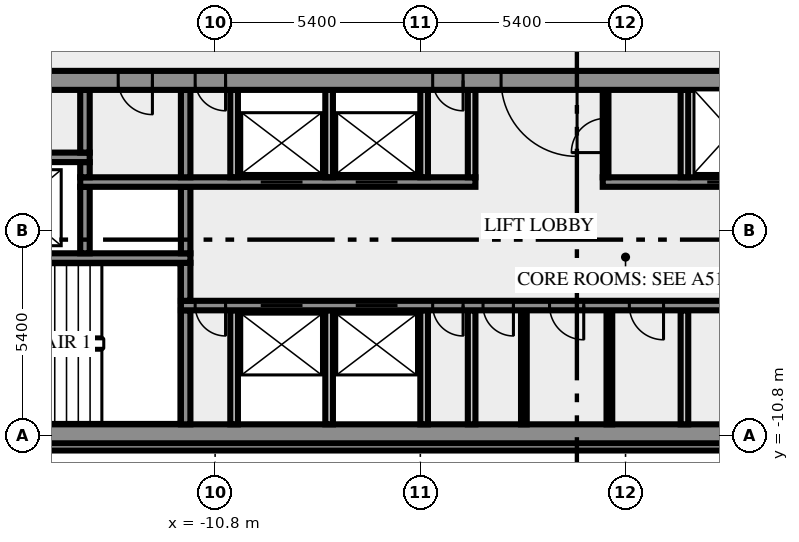
"""IFC4 building model, lengths in metres.
Left out: names, types, materials, properties, quantities, classifications, styles, units other than length and angle.
Written with IfcOpenShell. Run it as: python <this file> out.ifc"""

import sys

from ifc_helpers import new_model, si_unit, direction, frame, frame_2d, origin, place, context, subcontext, project, spatial, rectangle, extrude, element, fill, save


model = new_model("IFC4")
c1 = context("Model", 3, precision=1e-05, world=origin(), true_north=direction((0.0, 1.0)))
c2 = subcontext(c1, "Body", "Model", "MODEL_VIEW")
j1 = project(units=[si_unit("LENGTHUNIT", "METRE"), si_unit("PLANEANGLEUNIT", "RADIAN")], contexts=[c1])
p1 = place(None, origin())
s1 = spatial("IfcSite", under=j1, at=p1, CompositionType="ELEMENT")
p2 = place(p1, origin())
s2 = spatial("IfcBuilding", under=s1, at=p2, CompositionType="ELEMENT")
p3 = place(p2, frame((0.0, 0.0, 315.0)))
s3 = spatial("IfcBuildingStorey", under=s2, at=p3, CompositionType="ELEMENT", Elevation=315.0)
p4 = place(p3, frame((-17.444, -11.088, 0.0), z_axis=(0.0, 0.0, 1.0), x_axis=(1.0, 0.0, 0.0)))
e1 = element("IfcWall", 1, at=p4, inside=s3, PredefinedType="SOLIDWALL", context=c2, shape_type="SweptSolid", body=[
    extrude(rectangle(XDim=34.888, YDim=0.2, at=frame_2d((17.444, 0.0))), origin(), (0.0, 0.0, 1.0), 3.65),
])
p5 = place(p3, frame((-20.0, -10.75, 0.0), z_axis=(0.0, 0.0, 1.0), x_axis=(1.0, 0.0, 0.0)))
e2 = element("IfcWall", 2, at=p5, inside=s3, PredefinedType="SHEAR", context=c2, shape_type="SweptSolid", body=[
    extrude(rectangle(XDim=40.0, YDim=0.5, at=frame_2d((20.0, 0.0))), origin(), (0.0, 0.0, 1.0), 3.65),
])
p6 = place(p5, frame((0.8, 0.0, 1.0)))
e3 = element("IfcOpeningElement", 3, at=p6, cuts=e2, PredefinedType="OPENING", context=c2, shape_type="SweptSolid", body=[
    extrude(rectangle(XDim=1.2, YDim=1.2, at=frame_2d((0.6, 0.6))), frame((0.0, 0.26, 0.0), z_axis=(0.0, -1.0, 0.0), x_axis=(1.0, 0.0, 0.0)), (0.0, 0.0, 1.0), 0.52),
])
p7 = place(p5, frame((38.0, 0.0, 1.0)))
e4 = element("IfcOpeningElement", 4, at=p7, cuts=e2, PredefinedType="OPENING", context=c2, shape_type="SweptSolid", body=[
    extrude(rectangle(XDim=1.2, YDim=1.2, at=frame_2d((0.6, 0.6))), frame((0.0, 0.26, 0.0), z_axis=(0.0, -1.0, 0.0), x_axis=(1.0, 0.0, 0.0)), (0.0, 0.0, 1.0), 0.52),
])
p8 = place(p3, frame((-11.575, -10.5, 0.0), z_axis=(0.0, 0.0, 1.0), x_axis=(0.0, 1.0, 0.0)))
e5 = element("IfcWall", 5, at=p8, inside=s3, PredefinedType="SHEAR", context=c2, shape_type="SweptSolid", body=[
    extrude(rectangle(XDim=3.0, YDim=0.25, at=frame_2d((1.5, 0.0))), origin(), (0.0, 0.0, 1.0), 3.65),
])
for number, where, z_axis, x_axis in (
    (6, (-10.3, -10.5, 0.0), (0.0, 0.0, 1.0), (0.0, 1.0, 0.0)),
    (7, (-7.8, -10.5, 0.0), (0.0, 0.0, 1.0), (0.0, 1.0, 0.0)),
    (8, (-5.3, -10.5, 0.0), (0.0, 0.0, 1.0), (0.0, 1.0, 0.0)),
    (9, (-4.05, -10.5, 0.0), (0.0, 0.0, 1.0), (0.0, 1.0, 0.0)),
):
    element("IfcWall", number, at=place(p3, frame(where, z_axis=z_axis, x_axis=x_axis)), inside=s3, PredefinedType="SOLIDWALL", context=c2, shape_type="SweptSolid", body=[
        extrude(rectangle(XDim=3.0, YDim=0.2, at=frame_2d((1.5, 0.0))), origin(), (0.0, 0.0, 1.0), 3.65),
    ])
for number, where, z_axis, x_axis in (
    (10, (-2.675, -10.5, 0.0), (0.0, 0.0, 1.0), (0.0, 1.0, 0.0)),
    (11, (-0.425, -10.5, 0.0), (0.0, 0.0, 1.0), (0.0, 1.0, 0.0)),
):
    element("IfcWall", number, at=place(p3, frame(where, z_axis=z_axis, x_axis=x_axis)), inside=s3, PredefinedType="PARTITIONING", context=c2, shape_type="SweptSolid", body=[
        extrude(rectangle(XDim=3.0, YDim=0.15, at=frame_2d((1.5, 0.0))), origin(), (0.0, 0.0, 1.0), 3.65),
    ])
p9 = place(p3, frame((1.55, -10.5, 0.0), z_axis=(0.0, 0.0, 1.0), x_axis=(0.0, 1.0, 0.0)))
e12 = element("IfcWall", 12, at=p9, inside=s3, PredefinedType="SOLIDWALL", context=c2, shape_type="SweptSolid", body=[
    extrude(rectangle(XDim=3.0, YDim=0.2, at=frame_2d((1.5, 0.0))), origin(), (0.0, 0.0, 1.0), 3.65),
])
p10 = place(p3, frame((11.7, -7.375, 0.0), z_axis=(0.0, 0.0, 1.0), x_axis=(-1.0, 0.0, 0.0)))
e13 = element("IfcWall", 13, at=p10, inside=s3, PredefinedType="SHEAR", context=c2, shape_type="SweptSolid", body=[
    extrude(rectangle(XDim=23.4, YDim=0.25, at=frame_2d((11.7, 0.0))), origin(), (0.0, 0.0, 1.0), 3.65),
])
p11 = place(p10, frame((22.225, 0.0, 0.0)))
e14 = element("IfcOpeningElement", 14, at=p11, cuts=e13, PredefinedType="OPENING", context=c2, shape_type="SweptSolid", body=[
    extrude(rectangle(XDim=0.8, YDim=2.1, at=frame_2d((0.4, 1.05))), frame((0.0, 0.135, 0.0), z_axis=(0.0, -1.0, 0.0), x_axis=(1.0, 0.0, 0.0)), (0.0, 0.0, 1.0), 0.27),
])
p12 = place(p10, frame((20.2, 0.0, 0.0)))
e15 = element("IfcOpeningElement", 15, at=p12, cuts=e13, PredefinedType="OPENING", context=c2, shape_type="SweptSolid", body=[
    extrude(rectangle(XDim=1.1, YDim=2.1, at=frame_2d((0.55, 1.05))), frame((0.0, 0.135, 0.0), z_axis=(0.0, -1.0, 0.0), x_axis=(1.0, 0.0, 0.0)), (0.0, 0.0, 1.0), 0.27),
])
p13 = place(p10, frame((17.7, 0.0, 0.0)))
e16 = element("IfcOpeningElement", 16, at=p13, cuts=e13, PredefinedType="OPENING", context=c2, shape_type="SweptSolid", body=[
    extrude(rectangle(XDim=1.1, YDim=2.1, at=frame_2d((0.55, 1.05))), frame((0.0, 0.135, 0.0), z_axis=(0.0, -1.0, 0.0), x_axis=(1.0, 0.0, 0.0)), (0.0, 0.0, 1.0), 0.27),
])
p14 = place(p10, frame((15.975, 0.0, 0.0)))
e17 = element("IfcOpeningElement", 17, at=p14, cuts=e13, PredefinedType="OPENING", context=c2, shape_type="SweptSolid", body=[
    extrude(rectangle(XDim=0.8, YDim=2.1, at=frame_2d((0.4, 1.05))), frame((0.0, 0.135, 0.0), z_axis=(0.0, -1.0, 0.0), x_axis=(1.0, 0.0, 0.0)), (0.0, 0.0, 1.0), 0.27),
])
p15 = place(p10, frame((14.65, 0.0, 0.0)))
e18 = element("IfcOpeningElement", 18, at=p15, cuts=e13, PredefinedType="OPENING", context=c2, shape_type="SweptSolid", body=[
    extrude(rectangle(XDim=0.8, YDim=2.1, at=frame_2d((0.4, 1.05))), frame((0.0, 0.135, 0.0), z_axis=(0.0, -1.0, 0.0), x_axis=(1.0, 0.0, 0.0)), (0.0, 0.0, 1.0), 0.27),
])
p16 = place(p10, frame((12.8, 0.0, 0.0)))
e19 = element("IfcOpeningElement", 19, at=p16, cuts=e13, PredefinedType="OPENING", context=c2, shape_type="SweptSolid", body=[
    extrude(rectangle(XDim=0.9, YDim=2.1, at=frame_2d((0.45, 1.05))), frame((0.0, 0.135, 0.0), z_axis=(0.0, -1.0, 0.0), x_axis=(1.0, 0.0, 0.0)), (0.0, 0.0, 1.0), 0.27),
])
p17 = place(p10, frame((10.7, 0.0, 0.0)))
e20 = element("IfcOpeningElement", 20, at=p17, cuts=e13, PredefinedType="OPENING", context=c2, shape_type="SweptSolid", body=[
    extrude(rectangle(XDim=0.9, YDim=2.1, at=frame_2d((0.45, 1.05))), frame((0.0, 0.135, 0.0), z_axis=(0.0, -1.0, 0.0), x_axis=(1.0, 0.0, 0.0)), (0.0, 0.0, 1.0), 0.27),
])
p18 = place(p10, frame((6.237, 0.0, 0.0)))
e21 = element("IfcOpeningElement", 21, at=p18, cuts=e13, PredefinedType="OPENING", context=c2, shape_type="SweptSolid", body=[
    extrude(rectangle(XDim=0.9, YDim=2.1, at=frame_2d((0.45, 1.05))), frame((0.0, 0.135, 0.0), z_axis=(0.0, -1.0, 0.0), x_axis=(1.0, 0.0, 0.0)), (0.0, 0.0, 1.0), 0.27),
])
p19 = place(p10, frame((1.263, 0.0, 0.0)))
e22 = element("IfcOpeningElement", 22, at=p19, cuts=e13, PredefinedType="OPENING", context=c2, shape_type="SweptSolid", body=[
    extrude(rectangle(XDim=0.9, YDim=2.1, at=frame_2d((0.45, 1.05))), frame((0.0, 0.135, 0.0), z_axis=(0.0, -1.0, 0.0), x_axis=(1.0, 0.0, 0.0)), (0.0, 0.0, 1.0), 0.27),
])
p20 = place(p3, frame((-11.575, -7.25, 0.0), z_axis=(0.0, 0.0, 1.0), x_axis=(0.0, 1.0, 0.0)))
e23 = element("IfcWall", 23, at=p20, inside=s3, PredefinedType="SHEAR", context=c2, shape_type="SweptSolid", body=[
    extrude(rectangle(XDim=1.0, YDim=0.25, at=frame_2d((0.5, 0.0))), origin(), (0.0, 0.0, 1.0), 3.65),
])
p21 = place(p3, frame((-11.45, -6.125, 0.0), z_axis=(0.0, 0.0, 1.0), x_axis=(-1.0, 0.0, 0.0)))
e24 = element("IfcWall", 24, at=p21, inside=s3, PredefinedType="SHEAR", context=c2, shape_type="SweptSolid", body=[
    extrude(rectangle(XDim=8.05, YDim=0.25, at=frame_2d((4.025, 0.0))), origin(), (0.0, 0.0, 1.0), 3.65),
])
p22 = place(p21, frame((6.2, 0.0, 0.0)))
e25 = element("IfcOpeningElement", 25, at=p22, cuts=e24, PredefinedType="OPENING", context=c2, shape_type="SweptSolid", body=[
    extrude(rectangle(XDim=1.8, YDim=2.1, at=frame_2d((0.9, 1.05))), frame((0.0, 0.135, 0.0), z_axis=(0.0, -1.0, 0.0), x_axis=(1.0, 0.0, 0.0)), (0.0, 0.0, 1.0), 0.27),
])
for number, where, z_axis, x_axis in (
    (26, (-14.225, -6.0, 0.0), (0.0, 0.0, 1.0), (0.0, 1.0, 0.0)),
    (27, (-11.575, -6.0, 0.0), (0.0, 0.0, 1.0), (0.0, 1.0, 0.0)),
):
    element("IfcWall", number, at=place(p3, frame(where, z_axis=z_axis, x_axis=x_axis)), inside=s3, PredefinedType="SHEAR", context=c2, shape_type="SweptSolid", body=[
        extrude(rectangle(XDim=1.75, YDim=0.25, at=frame_2d((0.875, 0.0))), origin(), (0.0, 0.0, 1.0), 3.65),
    ])
p23 = place(p3, frame((-14.35, -4.125, 0.0), z_axis=(0.0, 0.0, 1.0), x_axis=(1.0, 0.0, 0.0)))
e28 = element("IfcWall", 28, at=p23, inside=s3, PredefinedType="SHEAR", context=c2, shape_type="SweptSolid", body=[
    extrude(rectangle(XDim=10.4, YDim=0.25, at=frame_2d((5.2, 0.0))), origin(), (0.0, 0.0, 1.0), 3.65),
])
p24 = place(p23, frame((4.75, 0.0, 0.0)))
e29 = element("IfcOpeningElement", 29, at=p24, cuts=e28, PredefinedType="OPENING", context=c2, shape_type="SweptSolid", body=[
    extrude(rectangle(XDim=1.1, YDim=2.1, at=frame_2d((0.55, 1.05))), frame((0.0, 0.135, 0.0), z_axis=(0.0, -1.0, 0.0), x_axis=(1.0, 0.0, 0.0)), (0.0, 0.0, 1.0), 0.27),
])
p25 = place(p23, frame((7.25, 0.0, 0.0)))
e30 = element("IfcOpeningElement", 30, at=p25, cuts=e28, PredefinedType="OPENING", context=c2, shape_type="SweptSolid", body=[
    extrude(rectangle(XDim=1.1, YDim=2.1, at=frame_2d((0.55, 1.05))), frame((0.0, 0.135, 0.0), z_axis=(0.0, -1.0, 0.0), x_axis=(1.0, 0.0, 0.0)), (0.0, 0.0, 1.0), 0.27),
])
p26 = place(p3, frame((-0.6, -4.125, 0.0), z_axis=(0.0, 0.0, 1.0), x_axis=(1.0, 0.0, 0.0)))
e31 = element("IfcWall", 31, at=p26, inside=s3, PredefinedType="SHEAR", context=c2, shape_type="SweptSolid", body=[
    extrude(rectangle(XDim=14.95, YDim=0.25, at=frame_2d((7.475, 0.0))), origin(), (0.0, 0.0, 1.0), 3.65),
])
p27 = place(p26, frame((2.75, 0.0, 0.0)))
e32 = element("IfcOpeningElement", 32, at=p27, cuts=e31, PredefinedType="OPENING", context=c2, shape_type="SweptSolid", body=[
    extrude(rectangle(XDim=1.3, YDim=2.1, at=frame_2d((0.65, 1.05))), frame((0.0, 0.135, 0.0), z_axis=(0.0, -1.0, 0.0), x_axis=(1.0, 0.0, 0.0)), (0.0, 0.0, 1.0), 0.27),
])
p28 = place(p3, frame((-14.225, -4.0, 0.0), z_axis=(0.0, 0.0, 1.0), x_axis=(0.0, 1.0, 0.0)))
e33 = element("IfcWall", 33, at=p28, inside=s3, PredefinedType="SHEAR", context=c2, shape_type="SweptSolid", body=[
    extrude(rectangle(XDim=0.4, YDim=0.25, at=frame_2d((0.2, 0.0))), origin(), (0.0, 0.0, 1.0), 3.65),
])
p29 = place(p3, frame((-11.575, -4.0, 0.0), z_axis=(0.0, 0.0, 1.0), x_axis=(0.0, 1.0, 0.0)))
e34 = element("IfcWall", 34, at=p29, inside=s3, PredefinedType="SHEAR", context=c2, shape_type="SweptSolid", body=[
    extrude(rectangle(XDim=2.3, YDim=0.25, at=frame_2d((1.15, 0.0))), origin(), (0.0, 0.0, 1.0), 3.65),
])
for number, where, z_axis, x_axis in (
    (35, (-10.3, -4.0, 0.0), (0.0, 0.0, 1.0), (0.0, 1.0, 0.0)),
    (36, (-7.8, -4.0, 0.0), (0.0, 0.0, 1.0), (0.0, 1.0, 0.0)),
    (37, (-5.3, -4.0, 0.0), (0.0, 0.0, 1.0), (0.0, 1.0, 0.0)),
    (38, (-4.05, -4.0, 0.0), (0.0, 0.0, 1.0), (0.0, 1.0, 0.0)),
):
    element("IfcWall", number, at=place(p3, frame(where, z_axis=z_axis, x_axis=x_axis)), inside=s3, PredefinedType="SOLIDWALL", context=c2, shape_type="SweptSolid", body=[
        extrude(rectangle(XDim=2.3, YDim=0.2, at=frame_2d((1.15, 0.0))), origin(), (0.0, 0.0, 1.0), 3.65),
    ])
p30 = place(p3, frame((-0.525, -4.0, 0.0), z_axis=(0.0, 0.0, 1.0), x_axis=(0.0, 1.0, 0.0)))
e39 = element("IfcWall", 39, at=p30, inside=s3, PredefinedType="PARTITIONING", context=c2, shape_type="SweptSolid", body=[
    extrude(rectangle(XDim=2.3, YDim=0.15, at=frame_2d((1.15, 0.0))), origin(), (0.0, 0.0, 1.0), 3.65),
])
p31 = place(p30, frame((0.65, 0.0, 0.0)))
e40 = element("IfcOpeningElement", 40, at=p31, cuts=e39, PredefinedType="OPENING", context=c2, shape_type="SweptSolid", body=[
    extrude(rectangle(XDim=0.9, YDim=2.1, at=frame_2d((0.45, 1.05))), frame((0.0, 0.085, 0.0), z_axis=(0.0, -1.0, 0.0), x_axis=(1.0, 0.0, 0.0)), (0.0, 0.0, 1.0), 0.17),
])
p32 = place(p3, frame((1.55, -4.0, 0.0), z_axis=(0.0, 0.0, 1.0), x_axis=(0.0, 1.0, 0.0)))
e41 = element("IfcWall", 41, at=p32, inside=s3, PredefinedType="SOLIDWALL", context=c2, shape_type="SweptSolid", body=[
    extrude(rectangle(XDim=2.3, YDim=0.2, at=frame_2d((1.15, 0.0))), origin(), (0.0, 0.0, 1.0), 3.65),
])
p33 = place(p3, frame((-17.35, -3.475, 0.0), z_axis=(0.0, 0.0, 1.0), x_axis=(1.0, 0.0, 0.0)))
e42 = element("IfcWall", 42, at=p33, inside=s3, PredefinedType="SHEAR", context=c2, shape_type="SweptSolid", body=[
    extrude(rectangle(XDim=3.25, YDim=0.25, at=frame_2d((1.625, 0.0))), origin(), (0.0, 0.0, 1.0), 3.65),
])
p34 = place(p3, frame((-14.225, -3.35, 0.0), z_axis=(0.0, 0.0, 1.0), x_axis=(0.0, 1.0, 0.0)))
e43 = element("IfcWall", 43, at=p34, inside=s3, PredefinedType="SHEAR", context=c2, shape_type="SweptSolid", body=[
    extrude(rectangle(XDim=1.65, YDim=0.25, at=frame_2d((0.825, 0.0))), origin(), (0.0, 0.0, 1.0), 3.65),
])
p35 = place(p3, frame((20.49, -1.45, 0.0), z_axis=(0.0, 0.0, 1.0), x_axis=(-1.0, 0.0, 0.0)))
e44 = element("IfcWall", 44, at=p35, inside=s3, PredefinedType="SHEAR", context=c2, shape_type="SweptSolid", body=[
    extrude(rectangle(XDim=40.98, YDim=0.5, at=frame_2d((20.49, 0.0))), origin(), (0.0, 0.0, 1.0), 3.65),
])
p36 = place(p35, frame((38.14, 0.0, 0.0)))
e45 = element("IfcOpeningElement", 45, at=p36, cuts=e44, PredefinedType="OPENING", context=c2, shape_type="SweptSolid", body=[
    extrude(rectangle(XDim=1.8, YDim=2.1, at=frame_2d((0.9, 1.05))), frame((0.0, 0.26, 0.0), z_axis=(0.0, -1.0, 0.0), x_axis=(1.0, 0.0, 0.0)), (0.0, 0.0, 1.0), 0.52),
])
p37 = place(p35, frame((35.89, 0.0, 0.0)))
e46 = element("IfcOpeningElement", 46, at=p37, cuts=e44, PredefinedType="OPENING", context=c2, shape_type="SweptSolid", body=[
    extrude(rectangle(XDim=0.9, YDim=2.1, at=frame_2d((0.45, 1.05))), frame((0.0, 0.26, 0.0), z_axis=(0.0, -1.0, 0.0), x_axis=(1.0, 0.0, 0.0)), (0.0, 0.0, 1.0), 0.52),
])
p38 = place(p35, frame((32.94, 0.0, 0.0)))
e47 = element("IfcOpeningElement", 47, at=p38, cuts=e44, PredefinedType="OPENING", context=c2, shape_type="SweptSolid", body=[
    extrude(rectangle(XDim=0.9, YDim=2.1, at=frame_2d((0.45, 1.05))), frame((0.0, 0.26, 0.0), z_axis=(0.0, -1.0, 0.0), x_axis=(1.0, 0.0, 0.0)), (0.0, 0.0, 1.0), 0.52),
])
p39 = place(p35, frame((31.015, 0.0, 0.0)))
e48 = element("IfcOpeningElement", 48, at=p39, cuts=e44, PredefinedType="OPENING", context=c2, shape_type="SweptSolid", body=[
    extrude(rectangle(XDim=0.8, YDim=2.1, at=frame_2d((0.4, 1.05))), frame((0.0, 0.26, 0.0), z_axis=(0.0, -1.0, 0.0), x_axis=(1.0, 0.0, 0.0)), (0.0, 0.0, 1.0), 0.52),
])
p40 = place(p35, frame((24.765, 0.0, 0.0)))
e49 = element("IfcOpeningElement", 49, at=p40, cuts=e44, PredefinedType="OPENING", context=c2, shape_type="SweptSolid", body=[
    extrude(rectangle(XDim=0.8, YDim=2.1, at=frame_2d((0.4, 1.05))), frame((0.0, 0.26, 0.0), z_axis=(0.0, -1.0, 0.0), x_axis=(1.0, 0.0, 0.0)), (0.0, 0.0, 1.0), 0.52),
])
p41 = place(p35, frame((21.765, 0.0, 0.0)))
e50 = element("IfcOpeningElement", 50, at=p41, cuts=e44, PredefinedType="OPENING", context=c2, shape_type="SweptSolid", body=[
    extrude(rectangle(XDim=2.0, YDim=2.1, at=frame_2d((1.0, 1.05))), frame((0.0, 0.26, 0.0), z_axis=(0.0, -1.0, 0.0), x_axis=(1.0, 0.0, 0.0)), (0.0, 0.0, 1.0), 0.52),
])
p42 = place(p35, frame((12.24, 0.0, 0.0)))
e51 = element("IfcOpeningElement", 51, at=p42, cuts=e44, PredefinedType="OPENING", context=c2, shape_type="SweptSolid", body=[
    extrude(rectangle(XDim=0.9, YDim=2.1, at=frame_2d((0.45, 1.05))), frame((0.0, 0.26, 0.0), z_axis=(0.0, -1.0, 0.0), x_axis=(1.0, 0.0, 0.0)), (0.0, 0.0, 1.0), 0.52),
])
p43 = place(p35, frame((7.14, 0.0, 0.0)))
e52 = element("IfcOpeningElement", 52, at=p43, cuts=e44, PredefinedType="OPENING", context=c2, shape_type="SweptSolid", body=[
    extrude(rectangle(XDim=0.9, YDim=2.1, at=frame_2d((0.45, 1.05))), frame((0.0, 0.26, 0.0), z_axis=(0.0, -1.0, 0.0), x_axis=(1.0, 0.0, 0.0)), (0.0, 0.0, 1.0), 0.52),
])
p44 = place(p35, frame((5.028, 0.0, 0.0)))
e53 = element("IfcOpeningElement", 53, at=p44, cuts=e44, PredefinedType="OPENING", context=c2, shape_type="SweptSolid", body=[
    extrude(rectangle(XDim=0.8, YDim=2.1, at=frame_2d((0.4, 1.05))), frame((0.0, 0.26, 0.0), z_axis=(0.0, -1.0, 0.0), x_axis=(1.0, 0.0, 0.0)), (0.0, 0.0, 1.0), 0.52),
])
p45 = place(p35, frame((3.452, 0.0, 0.0)))
e54 = element("IfcOpeningElement", 54, at=p45, cuts=e44, PredefinedType="OPENING", context=c2, shape_type="SweptSolid", body=[
    extrude(rectangle(XDim=0.8, YDim=2.1, at=frame_2d((0.4, 1.05))), frame((0.0, 0.26, 0.0), z_axis=(0.0, -1.0, 0.0), x_axis=(1.0, 0.0, 0.0)), (0.0, 0.0, 1.0), 0.52),
])
p46 = place(p35, frame((1.04, 0.0, 0.0)))
e55 = element("IfcOpeningElement", 55, at=p46, cuts=e44, PredefinedType="OPENING", context=c2, shape_type="SweptSolid", body=[
    extrude(rectangle(XDim=1.8, YDim=2.1, at=frame_2d((0.9, 1.05))), frame((0.0, 0.26, 0.0), z_axis=(0.0, -1.0, 0.0), x_axis=(1.0, 0.0, 0.0)), (0.0, 0.0, 1.0), 0.52),
])
p47 = place(p11, origin())
e56 = element("IfcDoor", 56, at=p47, inside=s3, OperationType="SINGLE_SWING_RIGHT", PredefinedType="DOOR", context=c2, shape_type="SweptSolid", body=[
    extrude(rectangle(XDim=0.8, YDim=2.1, at=frame_2d((0.4, 1.05))), frame((0.0, 0.025, 0.0), z_axis=(0.0, -1.0, 0.0), x_axis=(1.0, 0.0, 0.0)), (0.0, 0.0, 1.0), 0.05),
])
fill(e14, e56)
p48 = place(p12, origin())
e57 = element("IfcDoor", 57, at=p48, inside=s3, OperationType="DOUBLE_DOOR_SLIDING", PredefinedType="DOOR", context=c2, shape_type="SweptSolid", body=[
    extrude(rectangle(XDim=1.1, YDim=2.1, at=frame_2d((0.55, 1.05))), frame((0.0, 0.025, 0.0), z_axis=(0.0, -1.0, 0.0), x_axis=(1.0, 0.0, 0.0)), (0.0, 0.0, 1.0), 0.05),
])
fill(e15, e57)
p49 = place(p13, origin())
e58 = element("IfcDoor", 58, at=p49, inside=s3, OperationType="DOUBLE_DOOR_SLIDING", PredefinedType="DOOR", context=c2, shape_type="SweptSolid", body=[
    extrude(rectangle(XDim=1.1, YDim=2.1, at=frame_2d((0.55, 1.05))), frame((0.0, 0.025, 0.0), z_axis=(0.0, -1.0, 0.0), x_axis=(1.0, 0.0, 0.0)), (0.0, 0.0, 1.0), 0.05),
])
fill(e16, e58)
p50 = place(p14, origin())
e59 = element("IfcDoor", 59, at=p50, inside=s3, OperationType="SINGLE_SWING_RIGHT", PredefinedType="DOOR", context=c2, shape_type="SweptSolid", body=[
    extrude(rectangle(XDim=0.8, YDim=2.1, at=frame_2d((0.4, 1.05))), frame((0.0, 0.025, 0.0), z_axis=(0.0, -1.0, 0.0), x_axis=(1.0, 0.0, 0.0)), (0.0, 0.0, 1.0), 0.05),
])
fill(e17, e59)
p51 = place(p15, origin())
e60 = element("IfcDoor", 60, at=p51, inside=s3, OperationType="SINGLE_SWING_RIGHT", PredefinedType="DOOR", context=c2, shape_type="SweptSolid", body=[
    extrude(rectangle(XDim=0.8, YDim=2.1, at=frame_2d((0.4, 1.05))), frame((0.0, 0.025, 0.0), z_axis=(0.0, -1.0, 0.0), x_axis=(1.0, 0.0, 0.0)), (0.0, 0.0, 1.0), 0.05),
])
fill(e18, e60)
p52 = place(p16, origin())
e61 = element("IfcDoor", 61, at=p52, inside=s3, OperationType="SINGLE_SWING_RIGHT", PredefinedType="DOOR", context=c2, shape_type="SweptSolid", body=[
    extrude(rectangle(XDim=0.9, YDim=2.1, at=frame_2d((0.45, 1.05))), frame((0.0, 0.025, 0.0), z_axis=(0.0, -1.0, 0.0), x_axis=(1.0, 0.0, 0.0)), (0.0, 0.0, 1.0), 0.05),
])
fill(e19, e61)
p53 = place(p17, origin())
e62 = element("IfcDoor", 62, at=p53, inside=s3, OperationType="SINGLE_SWING_LEFT", PredefinedType="DOOR", context=c2, shape_type="SweptSolid", body=[
    extrude(rectangle(XDim=0.9, YDim=2.1, at=frame_2d((0.45, 1.05))), frame((0.0, 0.025, 0.0), z_axis=(0.0, -1.0, 0.0), x_axis=(1.0, 0.0, 0.0)), (0.0, 0.0, 1.0), 0.05),
])
fill(e20, e62)
p54 = place(p24, origin())
e63 = element("IfcDoor", 63, at=p54, inside=s3, OperationType="DOUBLE_DOOR_SLIDING", PredefinedType="DOOR", context=c2, shape_type="SweptSolid", body=[
    extrude(rectangle(XDim=1.1, YDim=2.1, at=frame_2d((0.55, 1.05))), frame((0.0, 0.025, 0.0), z_axis=(0.0, -1.0, 0.0), x_axis=(1.0, 0.0, 0.0)), (0.0, 0.0, 1.0), 0.05),
])
fill(e29, e63)
p55 = place(p25, origin())
e64 = element("IfcDoor", 64, at=p55, inside=s3, OperationType="DOUBLE_DOOR_SLIDING", PredefinedType="DOOR", context=c2, shape_type="SweptSolid", body=[
    extrude(rectangle(XDim=1.1, YDim=2.1, at=frame_2d((0.55, 1.05))), frame((0.0, 0.025, 0.0), z_axis=(0.0, -1.0, 0.0), x_axis=(1.0, 0.0, 0.0)), (0.0, 0.0, 1.0), 0.05),
])
fill(e30, e64)
p56 = place(p27, origin())
e65 = element("IfcDoor", 65, at=p56, inside=s3, OperationType="DOUBLE_DOOR_SLIDING", PredefinedType="DOOR", context=c2, shape_type="SweptSolid", body=[
    extrude(rectangle(XDim=1.3, YDim=2.1, at=frame_2d((0.65, 1.05))), frame((0.0, 0.025, 0.0), z_axis=(0.0, -1.0, 0.0), x_axis=(1.0, 0.0, 0.0)), (0.0, 0.0, 1.0), 0.05),
])
fill(e32, e65)
p57 = place(p31, origin())
e66 = element("IfcDoor", 66, at=p57, inside=s3, OperationType="SINGLE_SWING_LEFT", PredefinedType="DOOR", context=c2, shape_type="SweptSolid", body=[
    extrude(rectangle(XDim=0.9, YDim=2.1, at=frame_2d((0.45, 1.05))), frame((0.0, 0.025, 0.0), z_axis=(0.0, -1.0, 0.0), x_axis=(1.0, 0.0, 0.0)), (0.0, 0.0, 1.0), 0.05),
])
fill(e40, e66)
p58 = place(p38, origin())
e67 = element("IfcDoor", 67, at=p58, inside=s3, OperationType="SINGLE_SWING_RIGHT", PredefinedType="DOOR", context=c2, shape_type="SweptSolid", body=[
    extrude(rectangle(XDim=0.9, YDim=2.1, at=frame_2d((0.45, 1.05))), frame((0.0, 0.025, 0.0), z_axis=(0.0, -1.0, 0.0), x_axis=(1.0, 0.0, 0.0)), (0.0, 0.0, 1.0), 0.05),
])
fill(e47, e67)
p59 = place(p39, origin())
e68 = element("IfcDoor", 68, at=p59, inside=s3, OperationType="SINGLE_SWING_RIGHT", PredefinedType="DOOR", context=c2, shape_type="SweptSolid", body=[
    extrude(rectangle(XDim=0.8, YDim=2.1, at=frame_2d((0.4, 1.05))), frame((0.0, 0.025, 0.0), z_axis=(0.0, -1.0, 0.0), x_axis=(1.0, 0.0, 0.0)), (0.0, 0.0, 1.0), 0.05),
])
fill(e48, e68)
p60 = place(p40, origin())
e69 = element("IfcDoor", 69, at=p60, inside=s3, OperationType="SINGLE_SWING_RIGHT", PredefinedType="DOOR", context=c2, shape_type="SweptSolid", body=[
    extrude(rectangle(XDim=0.8, YDim=2.1, at=frame_2d((0.4, 1.05))), frame((0.0, 0.025, 0.0), z_axis=(0.0, -1.0, 0.0), x_axis=(1.0, 0.0, 0.0)), (0.0, 0.0, 1.0), 0.05),
])
fill(e49, e69)
p61 = place(p41, origin())
e70 = element("IfcDoor", 70, at=p61, inside=s3, OperationType="DOUBLE_DOOR_SINGLE_SWING", PredefinedType="DOOR", context=c2, shape_type="SweptSolid", body=[
    extrude(rectangle(XDim=2.0, YDim=2.1, at=frame_2d((1.0, 1.05))), frame((0.0, 0.025, 0.0), z_axis=(0.0, -1.0, 0.0), x_axis=(1.0, 0.0, 0.0)), (0.0, 0.0, 1.0), 0.05),
])
fill(e50, e70)
save(model, sys.argv[1])
